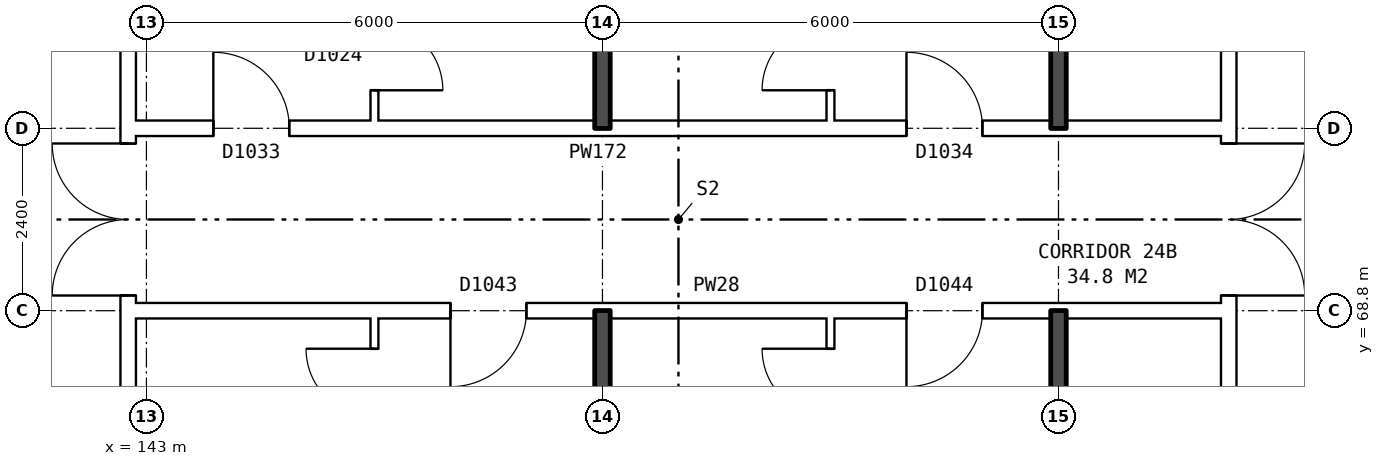
"""IFC4 building model, lengths in metres.
Left out: names, types, materials, properties, quantities, classifications, styles, units other than length and angle.
Written with IfcOpenShell. Run it as: python <this file> out.ifc"""

import sys

from ifc_helpers import new_model, si_unit, direction, frame, frame_2d, origin, place, context, subcontext, project, spatial, rectangle, extrude, element, fill, save


model = new_model("IFC4")
c1 = context("Model", 3, precision=1e-05, world=origin(), true_north=direction((0.0, 1.0)))
c2 = subcontext(c1, "Body", "Model", "MODEL_VIEW")
j1 = project(units=[si_unit("LENGTHUNIT", "METRE"), si_unit("PLANEANGLEUNIT", "RADIAN")], contexts=[c1])
p1 = place(None, origin())
s1 = spatial("IfcSite", under=j1, at=p1, CompositionType="ELEMENT")
p2 = place(p1, origin())
s2 = spatial("IfcBuilding", under=s1, at=p2, CompositionType="ELEMENT")
p3 = place(p2, frame((0.0, 0.0, 87.1)))
s3 = spatial("IfcBuildingStorey", under=s2, at=p3, CompositionType="ELEMENT", Elevation=87.1)
p4 = place(p3, frame((142.76, 63.9, 0.0), z_axis=(0.0, 0.0, 1.0), x_axis=(0.0, 1.0, 0.0)))
e1 = element("IfcWall", 1, at=p4, inside=s3, PredefinedType="PARTITIONING", context=c2, shape_type="SweptSolid", body=[
    extrude(rectangle(XDim=12.2, YDim=0.2, at=frame_2d((6.1, 0.0))), origin(), (0.0, 0.0, 1.0), 2.85),
])
p5 = place(p4, frame((5.1, 0.0, 0.0)))
e2 = element("IfcOpeningElement", 2, at=p5, cuts=e1, PredefinedType="OPENING", context=c2, shape_type="SweptSolid", body=[
    extrude(rectangle(XDim=2.0, YDim=2.1, at=frame_2d((1.0, 1.05))), frame((0.0, 0.11, 0.0), z_axis=(0.0, -1.0, 0.0), x_axis=(1.0, 0.0, 0.0)), (0.0, 0.0, 1.0), 0.22),
])
p6 = place(p3, frame((157.24, 63.9, 0.0), z_axis=(0.0, 0.0, 1.0), x_axis=(0.0, 1.0, 0.0)))
e3 = element("IfcWall", 3, at=p6, inside=s3, PredefinedType="PARTITIONING", context=c2, shape_type="SweptSolid", body=[
    extrude(rectangle(XDim=12.2, YDim=0.2, at=frame_2d((6.1, 0.0))), origin(), (0.0, 0.0, 1.0), 2.85),
])
p7 = place(p6, frame((5.1, 0.0, 0.0)))
e4 = element("IfcOpeningElement", 4, at=p7, cuts=e3, PredefinedType="OPENING", context=c2, shape_type="SweptSolid", body=[
    extrude(rectangle(XDim=2.0, YDim=2.1, at=frame_2d((1.0, 1.05))), frame((0.0, 0.11, 0.0), z_axis=(0.0, -1.0, 0.0), x_axis=(1.0, 0.0, 0.0)), (0.0, 0.0, 1.0), 0.22),
])
p8 = place(p3, frame((142.76, 68.8, 0.0), z_axis=(0.0, 0.0, 1.0), x_axis=(1.0, 0.0, 0.0)))
e5 = element("IfcWall", 5, at=p8, inside=s3, PredefinedType="PARTITIONING", context=c2, shape_type="SweptSolid", body=[
    extrude(rectangle(XDim=14.48, YDim=0.2, at=frame_2d((7.24, 0.0))), origin(), (0.0, 0.0, 1.0), 2.85),
])
p9 = place(p8, frame((4.24, 0.0, 0.0)))
e6 = element("IfcOpeningElement", 6, at=p9, cuts=e5, PredefinedType="OPENING", context=c2, shape_type="SweptSolid", body=[
    extrude(rectangle(XDim=1.0, YDim=2.1, at=frame_2d((0.5, 1.05))), frame((0.0, 0.11, 0.0), z_axis=(0.0, -1.0, 0.0), x_axis=(1.0, 0.0, 0.0)), (0.0, 0.0, 1.0), 0.22),
])
p10 = place(p8, frame((10.24, 0.0, 0.0)))
e7 = element("IfcOpeningElement", 7, at=p10, cuts=e5, PredefinedType="OPENING", context=c2, shape_type="SweptSolid", body=[
    extrude(rectangle(XDim=1.0, YDim=2.1, at=frame_2d((0.5, 1.05))), frame((0.0, 0.11, 0.0), z_axis=(0.0, -1.0, 0.0), x_axis=(1.0, 0.0, 0.0)), (0.0, 0.0, 1.0), 0.22),
])
p11 = place(p3, frame((142.76, 71.2, 0.0), z_axis=(0.0, 0.0, 1.0), x_axis=(1.0, 0.0, 0.0)))
e8 = element("IfcWall", 8, at=p11, inside=s3, PredefinedType="PARTITIONING", context=c2, shape_type="SweptSolid", body=[
    extrude(rectangle(XDim=14.48, YDim=0.2, at=frame_2d((7.24, 0.0))), origin(), (0.0, 0.0, 1.0), 2.85),
])
p12 = place(p11, frame((1.12, 0.0, 0.0)))
e9 = element("IfcOpeningElement", 9, at=p12, cuts=e8, PredefinedType="OPENING", context=c2, shape_type="SweptSolid", body=[
    extrude(rectangle(XDim=1.0, YDim=2.1, at=frame_2d((0.5, 1.05))), frame((0.0, 0.11, 0.0), z_axis=(0.0, -1.0, 0.0), x_axis=(1.0, 0.0, 0.0)), (0.0, 0.0, 1.0), 0.22),
])
p13 = place(p11, frame((10.24, 0.0, 0.0)))
e10 = element("IfcOpeningElement", 10, at=p13, cuts=e8, PredefinedType="OPENING", context=c2, shape_type="SweptSolid", body=[
    extrude(rectangle(XDim=1.0, YDim=2.1, at=frame_2d((0.5, 1.05))), frame((0.0, 0.11, 0.0), z_axis=(0.0, -1.0, 0.0), x_axis=(1.0, 0.0, 0.0)), (0.0, 0.0, 1.0), 0.22),
])
p14 = place(p3, frame((146.0, 54.36, 0.0), z_axis=(0.0, 0.0, 1.0), x_axis=(0.0, 1.0, 0.0)))
e11 = element("IfcWall", 11, at=p14, inside=s3, PredefinedType="PARTITIONING", context=c2, shape_type="SweptSolid", body=[
    extrude(rectangle(XDim=14.34, YDim=0.1, at=frame_2d((7.17, 0.0))), origin(), (0.0, 0.0, 1.0), 2.85),
])
p15 = place(p14, frame((6.7, 0.0, 0.0)))
e12 = element("IfcOpeningElement", 12, at=p15, cuts=e11, PredefinedType="OPENING", context=c2, shape_type="SweptSolid", body=[
    extrude(rectangle(XDim=0.9, YDim=2.1, at=frame_2d((0.45, 1.05))), frame((0.0, 0.06, 0.0), z_axis=(0.0, -1.0, 0.0), x_axis=(1.0, 0.0, 0.0)), (0.0, 0.0, 1.0), 0.12),
])
p16 = place(p14, frame((13.04, 0.0, 0.0)))
e13 = element("IfcOpeningElement", 13, at=p16, cuts=e11, PredefinedType="OPENING", context=c2, shape_type="SweptSolid", body=[
    extrude(rectangle(XDim=0.9, YDim=2.1, at=frame_2d((0.45, 1.05))), frame((0.0, 0.06, 0.0), z_axis=(0.0, -1.0, 0.0), x_axis=(1.0, 0.0, 0.0)), (0.0, 0.0, 1.0), 0.12),
])
p17 = place(p3, frame((146.0, 71.3, 0.0), z_axis=(0.0, 0.0, 1.0), x_axis=(0.0, 1.0, 0.0)))
e14 = element("IfcWall", 14, at=p17, inside=s3, PredefinedType="PARTITIONING", context=c2, shape_type="SweptSolid", body=[
    extrude(rectangle(XDim=14.34, YDim=0.1, at=frame_2d((7.17, 0.0))), origin(), (0.0, 0.0, 1.0), 2.85),
])
p18 = place(p17, frame((5.74, 0.0, 0.0)))
e15 = element("IfcOpeningElement", 15, at=p18, cuts=e14, PredefinedType="OPENING", context=c2, shape_type="SweptSolid", body=[
    extrude(rectangle(XDim=0.9, YDim=2.1, at=frame_2d((0.45, 1.05))), frame((0.0, 0.06, 0.0), z_axis=(0.0, -1.0, 0.0), x_axis=(1.0, 0.0, 0.0)), (0.0, 0.0, 1.0), 0.12),
])
p19 = place(p17, frame((0.4, 0.0, 0.0)))
e16 = element("IfcOpeningElement", 16, at=p19, cuts=e14, PredefinedType="OPENING", context=c2, shape_type="SweptSolid", body=[
    extrude(rectangle(XDim=0.9, YDim=2.1, at=frame_2d((0.45, 1.05))), frame((0.0, 0.06, 0.0), z_axis=(0.0, -1.0, 0.0), x_axis=(1.0, 0.0, 0.0)), (0.0, 0.0, 1.0), 0.12),
])
for number, where, z_axis, x_axis in (
    (17, (149.0, 54.36, 0.0), (0.0, 0.0, 1.0), (0.0, 1.0, 0.0)),
    (18, (149.0, 71.2, 0.0), (0.0, 0.0, 1.0), (0.0, 1.0, 0.0)),
):
    element("IfcWall", number, at=place(p3, frame(where, z_axis=z_axis, x_axis=x_axis)), inside=s3, PredefinedType="SOLIDWALL", context=c2, shape_type="SweptSolid", body=[
        extrude(rectangle(XDim=14.44, YDim=0.2, at=frame_2d((7.22, 0.0))), origin(), (0.0, 0.0, 1.0), 2.85),
    ])
p20 = place(p3, frame((152.0, 54.36, 0.0), z_axis=(0.0, 0.0, 1.0), x_axis=(0.0, 1.0, 0.0)))
e19 = element("IfcWall", 19, at=p20, inside=s3, PredefinedType="PARTITIONING", context=c2, shape_type="SweptSolid", body=[
    extrude(rectangle(XDim=14.34, YDim=0.1, at=frame_2d((7.17, 0.0))), origin(), (0.0, 0.0, 1.0), 2.85),
])
p21 = place(p20, frame((6.7, 0.0, 0.0)))
e20 = element("IfcOpeningElement", 20, at=p21, cuts=e19, PredefinedType="OPENING", context=c2, shape_type="SweptSolid", body=[
    extrude(rectangle(XDim=0.9, YDim=2.1, at=frame_2d((0.45, 1.05))), frame((0.0, 0.06, 0.0), z_axis=(0.0, -1.0, 0.0), x_axis=(1.0, 0.0, 0.0)), (0.0, 0.0, 1.0), 0.12),
])
p22 = place(p20, frame((13.04, 0.0, 0.0)))
e21 = element("IfcOpeningElement", 21, at=p22, cuts=e19, PredefinedType="OPENING", context=c2, shape_type="SweptSolid", body=[
    extrude(rectangle(XDim=0.9, YDim=2.1, at=frame_2d((0.45, 1.05))), frame((0.0, 0.06, 0.0), z_axis=(0.0, -1.0, 0.0), x_axis=(1.0, 0.0, 0.0)), (0.0, 0.0, 1.0), 0.12),
])
p23 = place(p3, frame((152.0, 71.3, 0.0), z_axis=(0.0, 0.0, 1.0), x_axis=(0.0, 1.0, 0.0)))
e22 = element("IfcWall", 22, at=p23, inside=s3, PredefinedType="PARTITIONING", context=c2, shape_type="SweptSolid", body=[
    extrude(rectangle(XDim=14.34, YDim=0.1, at=frame_2d((7.17, 0.0))), origin(), (0.0, 0.0, 1.0), 2.85),
])
p24 = place(p23, frame((9.24, 0.0, 0.0)))
e23 = element("IfcOpeningElement", 23, at=p24, cuts=e22, PredefinedType="OPENING", context=c2, shape_type="SweptSolid", body=[
    extrude(rectangle(XDim=0.9, YDim=2.1, at=frame_2d((0.45, 1.05))), frame((0.0, 0.06, 0.0), z_axis=(0.0, -1.0, 0.0), x_axis=(1.0, 0.0, 0.0)), (0.0, 0.0, 1.0), 0.12),
])
p25 = place(p23, frame((0.4, 0.0, 0.0)))
e24 = element("IfcOpeningElement", 24, at=p25, cuts=e22, PredefinedType="OPENING", context=c2, shape_type="SweptSolid", body=[
    extrude(rectangle(XDim=0.9, YDim=2.1, at=frame_2d((0.45, 1.05))), frame((0.0, 0.06, 0.0), z_axis=(0.0, -1.0, 0.0), x_axis=(1.0, 0.0, 0.0)), (0.0, 0.0, 1.0), 0.12),
])
for number, where, z_axis, x_axis in (
    (25, (155.0, 63.8, 0.0), (0.0, 0.0, 1.0), (0.0, 1.0, 0.0)),
    (26, (155.0, 71.2, 0.0), (0.0, 0.0, 1.0), (0.0, 1.0, 0.0)),
):
    element("IfcWall", number, at=place(p3, frame(where, z_axis=z_axis, x_axis=x_axis)), inside=s3, PredefinedType="SOLIDWALL", context=c2, shape_type="SweptSolid", body=[
        extrude(rectangle(XDim=5.0, YDim=0.2, at=frame_2d((2.5, 0.0))), origin(), (0.0, 0.0, 1.0), 2.85),
    ])
p26 = place(p5, origin())
e27 = element("IfcDoor", 27, at=p26, inside=s3, OperationType="DOUBLE_DOOR_SINGLE_SWING", PredefinedType="DOOR", context=c2, shape_type="SweptSolid", body=[
    extrude(rectangle(XDim=2.0, YDim=2.1, at=frame_2d((1.0, 1.05))), frame((0.0, 0.025, 0.0), z_axis=(0.0, -1.0, 0.0), x_axis=(1.0, 0.0, 0.0)), (0.0, 0.0, 1.0), 0.05),
])
fill(e2, e27)
p27 = place(p7, frame((2.0, 0.0, 0.0), z_axis=(0.0, 0.0, 1.0), x_axis=(-1.0, 0.0, 0.0)))
e28 = element("IfcDoor", 28, at=p27, inside=s3, OperationType="DOUBLE_DOOR_SINGLE_SWING", PredefinedType="DOOR", context=c2, shape_type="SweptSolid", body=[
    extrude(rectangle(XDim=2.0, YDim=2.1, at=frame_2d((1.0, 1.05))), frame((0.0, 0.025, 0.0), z_axis=(0.0, -1.0, 0.0), x_axis=(1.0, 0.0, 0.0)), (0.0, 0.0, 1.0), 0.05),
])
fill(e4, e28)
p28 = place(p9, frame((1.0, 0.0, 0.0), z_axis=(0.0, 0.0, 1.0), x_axis=(-1.0, 0.0, 0.0)))
e29 = element("IfcDoor", 29, at=p28, inside=s3, OperationType="SINGLE_SWING_RIGHT", PredefinedType="DOOR", context=c2, shape_type="SweptSolid", body=[
    extrude(rectangle(XDim=1.0, YDim=2.1, at=frame_2d((0.5, 1.05))), frame((0.0, 0.025, 0.0), z_axis=(0.0, -1.0, 0.0), x_axis=(1.0, 0.0, 0.0)), (0.0, 0.0, 1.0), 0.05),
])
fill(e6, e29)
p29 = place(p16, origin())
e30 = element("IfcDoor", 30, at=p29, inside=s3, OperationType="SINGLE_SWING_RIGHT", PredefinedType="DOOR", context=c2, shape_type="SweptSolid", body=[
    extrude(rectangle(XDim=0.9, YDim=2.1, at=frame_2d((0.45, 1.05))), frame((0.0, 0.025, 0.0), z_axis=(0.0, -1.0, 0.0), x_axis=(1.0, 0.0, 0.0)), (0.0, 0.0, 1.0), 0.05),
])
fill(e13, e30)
p30 = place(p10, frame((1.0, 0.0, 0.0), z_axis=(0.0, 0.0, 1.0), x_axis=(-1.0, 0.0, 0.0)))
e31 = element("IfcDoor", 31, at=p30, inside=s3, OperationType="SINGLE_SWING_RIGHT", PredefinedType="DOOR", context=c2, shape_type="SweptSolid", body=[
    extrude(rectangle(XDim=1.0, YDim=2.1, at=frame_2d((0.5, 1.05))), frame((0.0, 0.025, 0.0), z_axis=(0.0, -1.0, 0.0), x_axis=(1.0, 0.0, 0.0)), (0.0, 0.0, 1.0), 0.05),
])
fill(e7, e31)
p31 = place(p22, origin())
e32 = element("IfcDoor", 32, at=p31, inside=s3, OperationType="SINGLE_SWING_RIGHT", PredefinedType="DOOR", context=c2, shape_type="SweptSolid", body=[
    extrude(rectangle(XDim=0.9, YDim=2.1, at=frame_2d((0.45, 1.05))), frame((0.0, 0.025, 0.0), z_axis=(0.0, -1.0, 0.0), x_axis=(1.0, 0.0, 0.0)), (0.0, 0.0, 1.0), 0.05),
])
fill(e21, e32)
p32 = place(p12, origin())
e33 = element("IfcDoor", 33, at=p32, inside=s3, OperationType="SINGLE_SWING_LEFT", PredefinedType="DOOR", context=c2, shape_type="SweptSolid", body=[
    extrude(rectangle(XDim=1.0, YDim=2.1, at=frame_2d((0.5, 1.05))), frame((0.0, 0.025, 0.0), z_axis=(0.0, -1.0, 0.0), x_axis=(1.0, 0.0, 0.0)), (0.0, 0.0, 1.0), 0.05),
])
fill(e9, e33)
p33 = place(p19, frame((0.9, 0.0, 0.0), z_axis=(0.0, 0.0, 1.0), x_axis=(-1.0, 0.0, 0.0)))
e34 = element("IfcDoor", 34, at=p33, inside=s3, OperationType="SINGLE_SWING_RIGHT", PredefinedType="DOOR", context=c2, shape_type="SweptSolid", body=[
    extrude(rectangle(XDim=0.9, YDim=2.1, at=frame_2d((0.45, 1.05))), frame((0.0, 0.025, 0.0), z_axis=(0.0, -1.0, 0.0), x_axis=(1.0, 0.0, 0.0)), (0.0, 0.0, 1.0), 0.05),
])
fill(e16, e34)
p34 = place(p13, origin())
e35 = element("IfcDoor", 35, at=p34, inside=s3, OperationType="SINGLE_SWING_LEFT", PredefinedType="DOOR", context=c2, shape_type="SweptSolid", body=[
    extrude(rectangle(XDim=1.0, YDim=2.1, at=frame_2d((0.5, 1.05))), frame((0.0, 0.025, 0.0), z_axis=(0.0, -1.0, 0.0), x_axis=(1.0, 0.0, 0.0)), (0.0, 0.0, 1.0), 0.05),
])
fill(e10, e35)
p35 = place(p25, origin())
e36 = element("IfcDoor", 36, at=p35, inside=s3, OperationType="SINGLE_SWING_LEFT", PredefinedType="DOOR", context=c2, shape_type="SweptSolid", body=[
    extrude(rectangle(XDim=0.9, YDim=2.1, at=frame_2d((0.45, 1.05))), frame((0.0, 0.025, 0.0), z_axis=(0.0, -1.0, 0.0), x_axis=(1.0, 0.0, 0.0)), (0.0, 0.0, 1.0), 0.05),
])
fill(e24, e36)
save(model, sys.argv[1])
